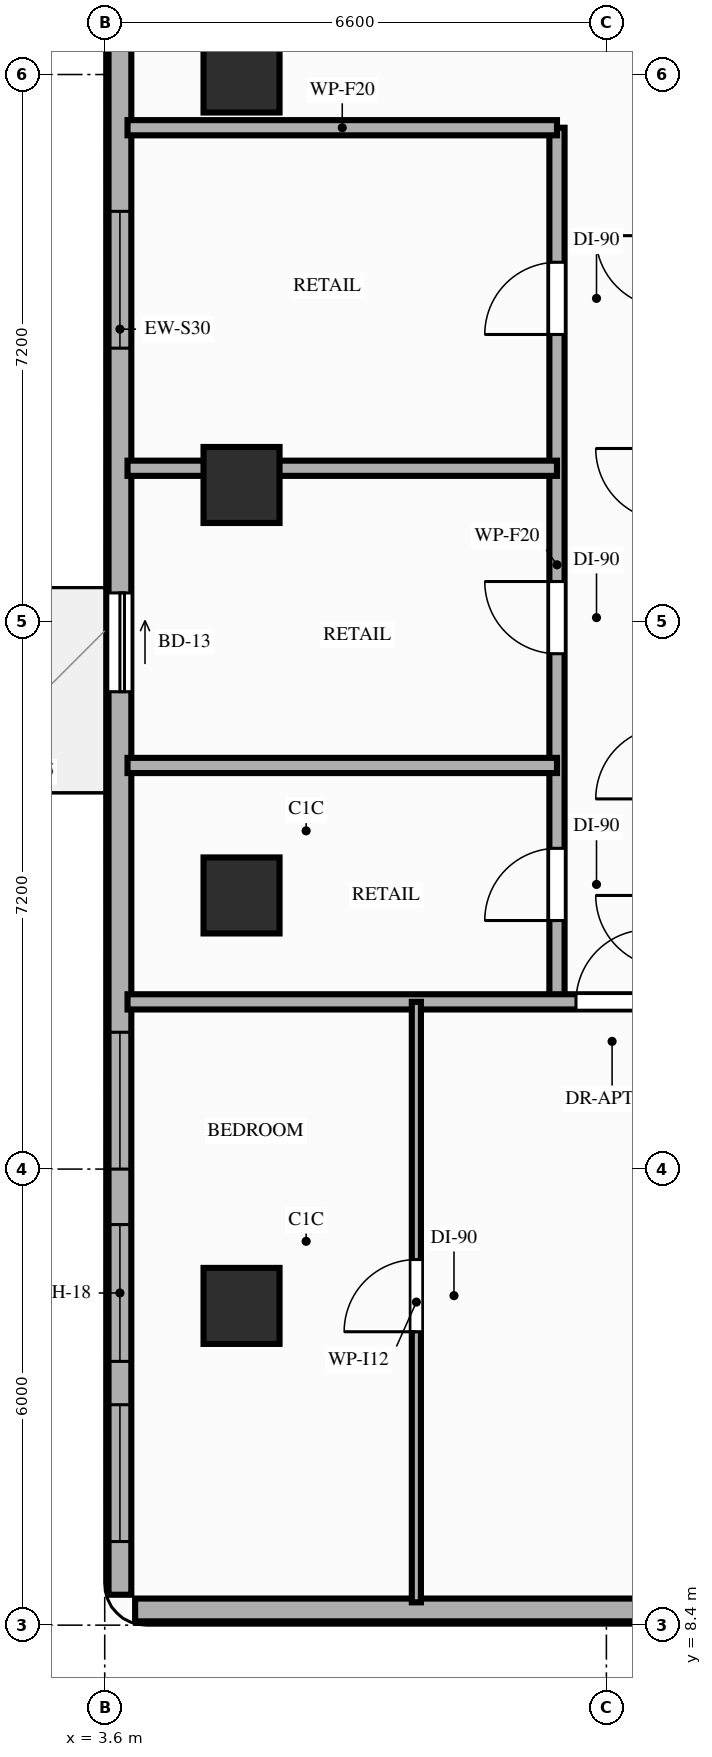
"""IFC4 building model, lengths in metres.
Left out: names, types, materials, properties, quantities, classifications, styles, units other than length and angle.
Written with IfcOpenShell. Run it as: python <this file> out.ifc"""

import sys

from ifc_helpers import new_model, si_unit, direction, frame, frame_2d, origin, origin_2d, place, context, subcontext, project, spatial, rectangle, extrude, element, fill, save


model = new_model("IFC4")
c1 = context("Model", 3, precision=1e-05, world=origin(), true_north=direction((0.0, 1.0)))
c2 = subcontext(c1, "Body", "Model", "MODEL_VIEW")
j1 = project(units=[si_unit("LENGTHUNIT", "METRE"), si_unit("PLANEANGLEUNIT", "RADIAN")], contexts=[c1])
p1 = place(None, origin())
s1 = spatial("IfcSite", under=j1, at=p1, CompositionType="ELEMENT")
p2 = place(p1, origin())
s2 = spatial("IfcBuilding", under=s1, at=p2, CompositionType="ELEMENT")
p3 = place(p2, frame((0.0, 0.0, 117.0)))
s3 = spatial("IfcBuildingStorey", under=s2, at=p3, CompositionType="ELEMENT", Elevation=117.0)
for number, where, z_axis, x_axis in (
    (1, (5.4, 12.6, 0.0), (0.0, 0.0, 1.0), (1.0, 0.0, 0.0)),
    (2, (5.4, 18.0, 0.0), (0.0, 0.0, 1.0), (1.0, 0.0, 0.0)),
    (3, (5.4, 23.4, 0.0), (0.0, 0.0, 1.0), (1.0, 0.0, 0.0)),
    (4, (5.4, 28.8, 0.0), (0.0, 0.0, 1.0), (1.0, 0.0, 0.0)),
):
    element("IfcColumn", number, at=place(p3, frame(where, z_axis=z_axis, x_axis=x_axis)), inside=s3, PredefinedType="COLUMN", context=c2, shape_type="SweptSolid", body=[
        extrude(rectangle(XDim=1.0, YDim=1.0, at=origin_2d()), origin(), (0.0, 0.0, 1.0), 3.2),
    ])
p4 = place(p3, frame((4.0, 8.6, 0.0), z_axis=(0.0, 0.0, 1.0), x_axis=(1.0, 0.0, 0.0)))
e5 = element("IfcWall", 5, at=p4, inside=s3, PredefinedType="STANDARD", context=c2, shape_type="SweptSolid", body=[
    extrude(rectangle(XDim=15.8, YDim=0.3, at=frame_2d((7.9, 0.0))), origin(), (0.0, 0.0, 1.0), 3.02),
])
p5 = place(p4, frame((6.85, 0.0, 0.85)))
e6 = element("IfcOpeningElement", 6, at=p5, cuts=e5, PredefinedType="OPENING", context=c2, shape_type="SweptSolid", body=[
    extrude(rectangle(XDim=1.8, YDim=1.75, at=frame_2d((0.9, 0.875))), frame((0.0, 0.16, 0.0), z_axis=(0.0, -1.0, 0.0), x_axis=(1.0, 0.0, 0.0)), (0.0, 0.0, 1.0), 0.32),
])
p6 = place(p3, frame((3.8, 42.1, 0.0), z_axis=(0.0, 0.0, 1.0), x_axis=(0.0, -1.0, 0.0)))
e7 = element("IfcWall", 7, at=p6, inside=s3, PredefinedType="STANDARD", context=c2, shape_type="SweptSolid", body=[
    extrude(rectangle(XDim=33.3, YDim=0.3, at=frame_2d((16.65, 0.0))), origin(), (0.0, 0.0, 1.0), 2.7),
])
p7 = place(p6, frame((20.12, 0.0, 0.0)))
e8 = element("IfcOpeningElement", 8, at=p7, cuts=e7, PredefinedType="OPENING", context=c2, shape_type="SweptSolid", body=[
    extrude(rectangle(XDim=1.3, YDim=2.08, at=frame_2d((0.65, 1.04))), frame((0.0, 0.16, 0.0), z_axis=(0.0, -1.0, 0.0), x_axis=(1.0, 0.0, 0.0)), (0.0, 0.0, 1.0), 0.32),
])
p8 = place(p6, frame((28.43, 0.0, 0.85)))
e9 = element("IfcOpeningElement", 9, at=p8, cuts=e7, PredefinedType="OPENING", context=c2, shape_type="SweptSolid", body=[
    extrude(rectangle(XDim=1.8, YDim=1.6, at=frame_2d((0.9, 0.8))), frame((0.0, 0.16, 0.0), z_axis=(0.0, -1.0, 0.0), x_axis=(1.0, 0.0, 0.0)), (0.0, 0.0, 1.0), 0.32),
])
p9 = place(p6, frame((30.8, 0.0, 0.85)))
e10 = element("IfcOpeningElement", 10, at=p9, cuts=e7, PredefinedType="OPENING", context=c2, shape_type="SweptSolid", body=[
    extrude(rectangle(XDim=1.8, YDim=1.6, at=frame_2d((0.9, 0.8))), frame((0.0, 0.16, 0.0), z_axis=(0.0, -1.0, 0.0), x_axis=(1.0, 0.0, 0.0)), (0.0, 0.0, 1.0), 0.32),
])
p10 = place(p6, frame((25.9, 0.0, 0.85)))
e11 = element("IfcOpeningElement", 11, at=p10, cuts=e7, PredefinedType="OPENING", context=c2, shape_type="SweptSolid", body=[
    extrude(rectangle(XDim=1.8, YDim=1.6, at=frame_2d((0.9, 0.8))), frame((0.0, 0.16, 0.0), z_axis=(0.0, -1.0, 0.0), x_axis=(1.0, 0.0, 0.0)), (0.0, 0.0, 1.0), 0.32),
])
p11 = place(p6, frame((15.1, 0.0, 0.85)))
e12 = element("IfcOpeningElement", 12, at=p11, cuts=e7, PredefinedType="OPENING", context=c2, shape_type="SweptSolid", body=[
    extrude(rectangle(XDim=1.8, YDim=1.6, at=frame_2d((0.9, 0.8))), frame((0.0, 0.16, 0.0), z_axis=(0.0, -1.0, 0.0), x_axis=(1.0, 0.0, 0.0)), (0.0, 0.0, 1.0), 0.32),
])
p12 = place(p6, frame((9.9, 0.0, 0.85)))
e13 = element("IfcOpeningElement", 13, at=p12, cuts=e7, PredefinedType="OPENING", context=c2, shape_type="SweptSolid", body=[
    extrude(rectangle(XDim=1.8, YDim=1.6, at=frame_2d((0.9, 0.8))), frame((0.0, 0.16, 0.0), z_axis=(0.0, -1.0, 0.0), x_axis=(1.0, 0.0, 0.0)), (0.0, 0.0, 1.0), 0.32),
])
p13 = place(p6, frame((3.8, 0.0, 0.85)))
e14 = element("IfcOpeningElement", 14, at=p13, cuts=e7, PredefinedType="OPENING", context=c2, shape_type="SweptSolid", body=[
    extrude(rectangle(XDim=1.8, YDim=1.6, at=frame_2d((0.9, 0.8))), frame((0.0, 0.16, 0.0), z_axis=(0.0, -1.0, 0.0), x_axis=(1.0, 0.0, 0.0)), (0.0, 0.0, 1.0), 0.32),
])
p14 = place(p3, frame((9.55, 16.6, 0.0), z_axis=(0.0, 0.0, 1.0), x_axis=(0.0, 1.0, 0.0)))
e15 = element("IfcWall", 15, at=p14, inside=s3, PredefinedType="PARTITIONING", context=c2, shape_type="SweptSolid", body=[
    extrude(rectangle(XDim=11.5, YDim=0.2, at=frame_2d((5.75, 0.0))), origin(), (0.0, 0.0, 1.0), 2.41),
])
p15 = place(p14, frame((1.07, 0.0, 0.0)))
e16 = element("IfcOpeningElement", 16, at=p15, cuts=e15, PredefinedType="OPENING", context=c2, shape_type="SweptSolid", body=[
    extrude(rectangle(XDim=0.95, YDim=2.15, at=frame_2d((0.475, 1.075))), frame((0.0, 0.11, 0.0), z_axis=(0.0, -1.0, 0.0), x_axis=(1.0, 0.0, 0.0)), (0.0, 0.0, 1.0), 0.22),
])
p16 = place(p14, frame((4.58, 0.0, 0.0)))
e17 = element("IfcOpeningElement", 17, at=p16, cuts=e15, PredefinedType="OPENING", context=c2, shape_type="SweptSolid", body=[
    extrude(rectangle(XDim=0.95, YDim=2.15, at=frame_2d((0.475, 1.075))), frame((0.0, 0.11, 0.0), z_axis=(0.0, -1.0, 0.0), x_axis=(1.0, 0.0, 0.0)), (0.0, 0.0, 1.0), 0.22),
])
p17 = place(p14, frame((8.78, 0.0, 0.0)))
e18 = element("IfcOpeningElement", 18, at=p17, cuts=e15, PredefinedType="OPENING", context=c2, shape_type="SweptSolid", body=[
    extrude(rectangle(XDim=0.95, YDim=2.15, at=frame_2d((0.475, 1.075))), frame((0.0, 0.11, 0.0), z_axis=(0.0, -1.0, 0.0), x_axis=(1.0, 0.0, 0.0)), (0.0, 0.0, 1.0), 0.22),
])
p18 = place(p3, frame((3.9, 16.6, 0.0), z_axis=(0.0, 0.0, 1.0), x_axis=(1.0, 0.0, 0.0)))
e19 = element("IfcWall", 19, at=p18, inside=s3, PredefinedType="PARTITIONING", context=c2, shape_type="SweptSolid", body=[
    extrude(rectangle(XDim=16.0, YDim=0.2, at=frame_2d((8.0, 0.0))), origin(), (0.0, 0.0, 1.0), 2.41),
])
p19 = place(p18, frame((5.9, 0.0, 0.0)))
e20 = element("IfcOpeningElement", 20, at=p19, cuts=e19, PredefinedType="OPENING", context=c2, shape_type="SweptSolid", body=[
    extrude(rectangle(XDim=0.95, YDim=2.15, at=frame_2d((0.475, 1.075))), frame((0.0, 0.11, 0.0), z_axis=(0.0, -1.0, 0.0), x_axis=(1.0, 0.0, 0.0)), (0.0, 0.0, 1.0), 0.22),
])
for number, where, z_axis, x_axis in (
    (21, (3.9, 28.1, 0.0), (0.0, 0.0, 1.0), (1.0, 0.0, 0.0)),
    (22, (3.9, 19.71, 0.0), (0.0, 0.0, 1.0), (1.0, 0.0, 0.0)),
    (23, (3.9, 23.62, 0.0), (0.0, 0.0, 1.0), (1.0, 0.0, 0.0)),
):
    element("IfcWall", number, at=place(p3, frame(where, z_axis=z_axis, x_axis=x_axis)), inside=s3, PredefinedType="PARTITIONING", context=c2, shape_type="SweptSolid", body=[
        extrude(rectangle(XDim=5.65, YDim=0.2, at=frame_2d((2.825, 0.0))), origin(), (0.0, 0.0, 1.0), 2.41),
    ])
p20 = place(p3, frame((7.7, 8.7, 0.0), z_axis=(0.0, 0.0, 1.0), x_axis=(0.0, 1.0, 0.0)))
e24 = element("IfcWall", 24, at=p20, inside=s3, PredefinedType="PARTITIONING", context=c2, shape_type="SweptSolid", body=[
    extrude(rectangle(XDim=7.9, YDim=0.12, at=frame_2d((3.95, 0.0))), origin(), (0.0, 0.0, 1.0), 2.41),
])
p21 = place(p20, frame((3.56, 0.0, 0.0)))
e25 = element("IfcOpeningElement", 25, at=p21, cuts=e24, PredefinedType="OPENING", context=c2, shape_type="SweptSolid", body=[
    extrude(rectangle(XDim=0.95, YDim=2.15, at=frame_2d((0.475, 1.075))), frame((0.0, 0.07, 0.0), z_axis=(0.0, -1.0, 0.0), x_axis=(1.0, 0.0, 0.0)), (0.0, 0.0, 1.0), 0.14),
])
p22 = place(p7, origin())
e26 = element("IfcDoor", 26, at=p22, inside=s3, OperationType="SLIDING_TO_LEFT", PredefinedType="DOOR", context=c2, shape_type="SweptSolid", body=[
    extrude(rectangle(XDim=1.3, YDim=2.08, at=frame_2d((0.65, 1.04))), frame((0.0, 0.025, 0.0), z_axis=(0.0, -1.0, 0.0), x_axis=(1.0, 0.0, 0.0)), (0.0, 0.0, 1.0), 0.05),
])
fill(e8, e26)
p23 = place(p8, origin())
e27 = element("IfcWindow", 27, at=p23, inside=s3, PartitioningType="SINGLE_PANEL", PredefinedType="WINDOW", context=c2, shape_type="SweptSolid", body=[
    extrude(rectangle(XDim=1.8, YDim=1.6, at=frame_2d((0.9, 0.8))), frame((0.0, 0.03, 0.0), z_axis=(0.0, -1.0, 0.0), x_axis=(1.0, 0.0, 0.0)), (0.0, 0.0, 1.0), 0.06),
])
fill(e9, e27)
p24 = place(p9, origin())
e28 = element("IfcWindow", 28, at=p24, inside=s3, PartitioningType="SINGLE_PANEL", PredefinedType="WINDOW", context=c2, shape_type="SweptSolid", body=[
    extrude(rectangle(XDim=1.8, YDim=1.6, at=frame_2d((0.9, 0.8))), frame((0.0, 0.03, 0.0), z_axis=(0.0, -1.0, 0.0), x_axis=(1.0, 0.0, 0.0)), (0.0, 0.0, 1.0), 0.06),
])
fill(e10, e28)
p25 = place(p10, origin())
e29 = element("IfcWindow", 29, at=p25, inside=s3, PartitioningType="SINGLE_PANEL", PredefinedType="WINDOW", context=c2, shape_type="SweptSolid", body=[
    extrude(rectangle(XDim=1.8, YDim=1.6, at=frame_2d((0.9, 0.8))), frame((0.0, 0.03, 0.0), z_axis=(0.0, -1.0, 0.0), x_axis=(1.0, 0.0, 0.0)), (0.0, 0.0, 1.0), 0.06),
])
fill(e11, e29)
p26 = place(p11, origin())
e30 = element("IfcWindow", 30, at=p26, inside=s3, PartitioningType="SINGLE_PANEL", PredefinedType="WINDOW", context=c2, shape_type="SweptSolid", body=[
    extrude(rectangle(XDim=1.8, YDim=1.6, at=frame_2d((0.9, 0.8))), frame((0.0, 0.03, 0.0), z_axis=(0.0, -1.0, 0.0), x_axis=(1.0, 0.0, 0.0)), (0.0, 0.0, 1.0), 0.06),
])
fill(e12, e30)
p27 = place(p15, origin())
e31 = element("IfcDoor", 31, at=p27, inside=s3, OperationType="SINGLE_SWING_LEFT", PredefinedType="DOOR", context=c2, shape_type="SweptSolid", body=[
    extrude(rectangle(XDim=0.95, YDim=2.15, at=frame_2d((0.475, 1.075))), frame((0.0, 0.025, 0.0), z_axis=(0.0, -1.0, 0.0), x_axis=(1.0, 0.0, 0.0)), (0.0, 0.0, 1.0), 0.05),
])
fill(e16, e31)
p28 = place(p16, origin())
e32 = element("IfcDoor", 32, at=p28, inside=s3, OperationType="SINGLE_SWING_RIGHT", PredefinedType="DOOR", context=c2, shape_type="SweptSolid", body=[
    extrude(rectangle(XDim=0.95, YDim=2.15, at=frame_2d((0.475, 1.075))), frame((0.0, 0.025, 0.0), z_axis=(0.0, -1.0, 0.0), x_axis=(1.0, 0.0, 0.0)), (0.0, 0.0, 1.0), 0.05),
])
fill(e17, e32)
p29 = place(p17, origin())
e33 = element("IfcDoor", 33, at=p29, inside=s3, OperationType="SINGLE_SWING_LEFT", PredefinedType="DOOR", context=c2, shape_type="SweptSolid", body=[
    extrude(rectangle(XDim=0.95, YDim=2.15, at=frame_2d((0.475, 1.075))), frame((0.0, 0.025, 0.0), z_axis=(0.0, -1.0, 0.0), x_axis=(1.0, 0.0, 0.0)), (0.0, 0.0, 1.0), 0.05),
])
fill(e18, e33)
p30 = place(p19, origin())
e34 = element("IfcDoor", 34, at=p30, inside=s3, OperationType="SINGLE_SWING_RIGHT", PredefinedType="DOOR", context=c2, shape_type="SweptSolid", body=[
    extrude(rectangle(XDim=0.95, YDim=2.15, at=frame_2d((0.475, 1.075))), frame((0.0, 0.025, 0.0), z_axis=(0.0, -1.0, 0.0), x_axis=(1.0, 0.0, 0.0)), (0.0, 0.0, 1.0), 0.05),
])
fill(e20, e34)
p31 = place(p21, origin())
e35 = element("IfcDoor", 35, at=p31, inside=s3, OperationType="SINGLE_SWING_LEFT", PredefinedType="DOOR", context=c2, shape_type="SweptSolid", body=[
    extrude(rectangle(XDim=0.95, YDim=2.15, at=frame_2d((0.475, 1.075))), frame((0.0, 0.025, 0.0), z_axis=(0.0, -1.0, 0.0), x_axis=(1.0, 0.0, 0.0)), (0.0, 0.0, 1.0), 0.05),
])
fill(e25, e35)
save(model, sys.argv[1])
